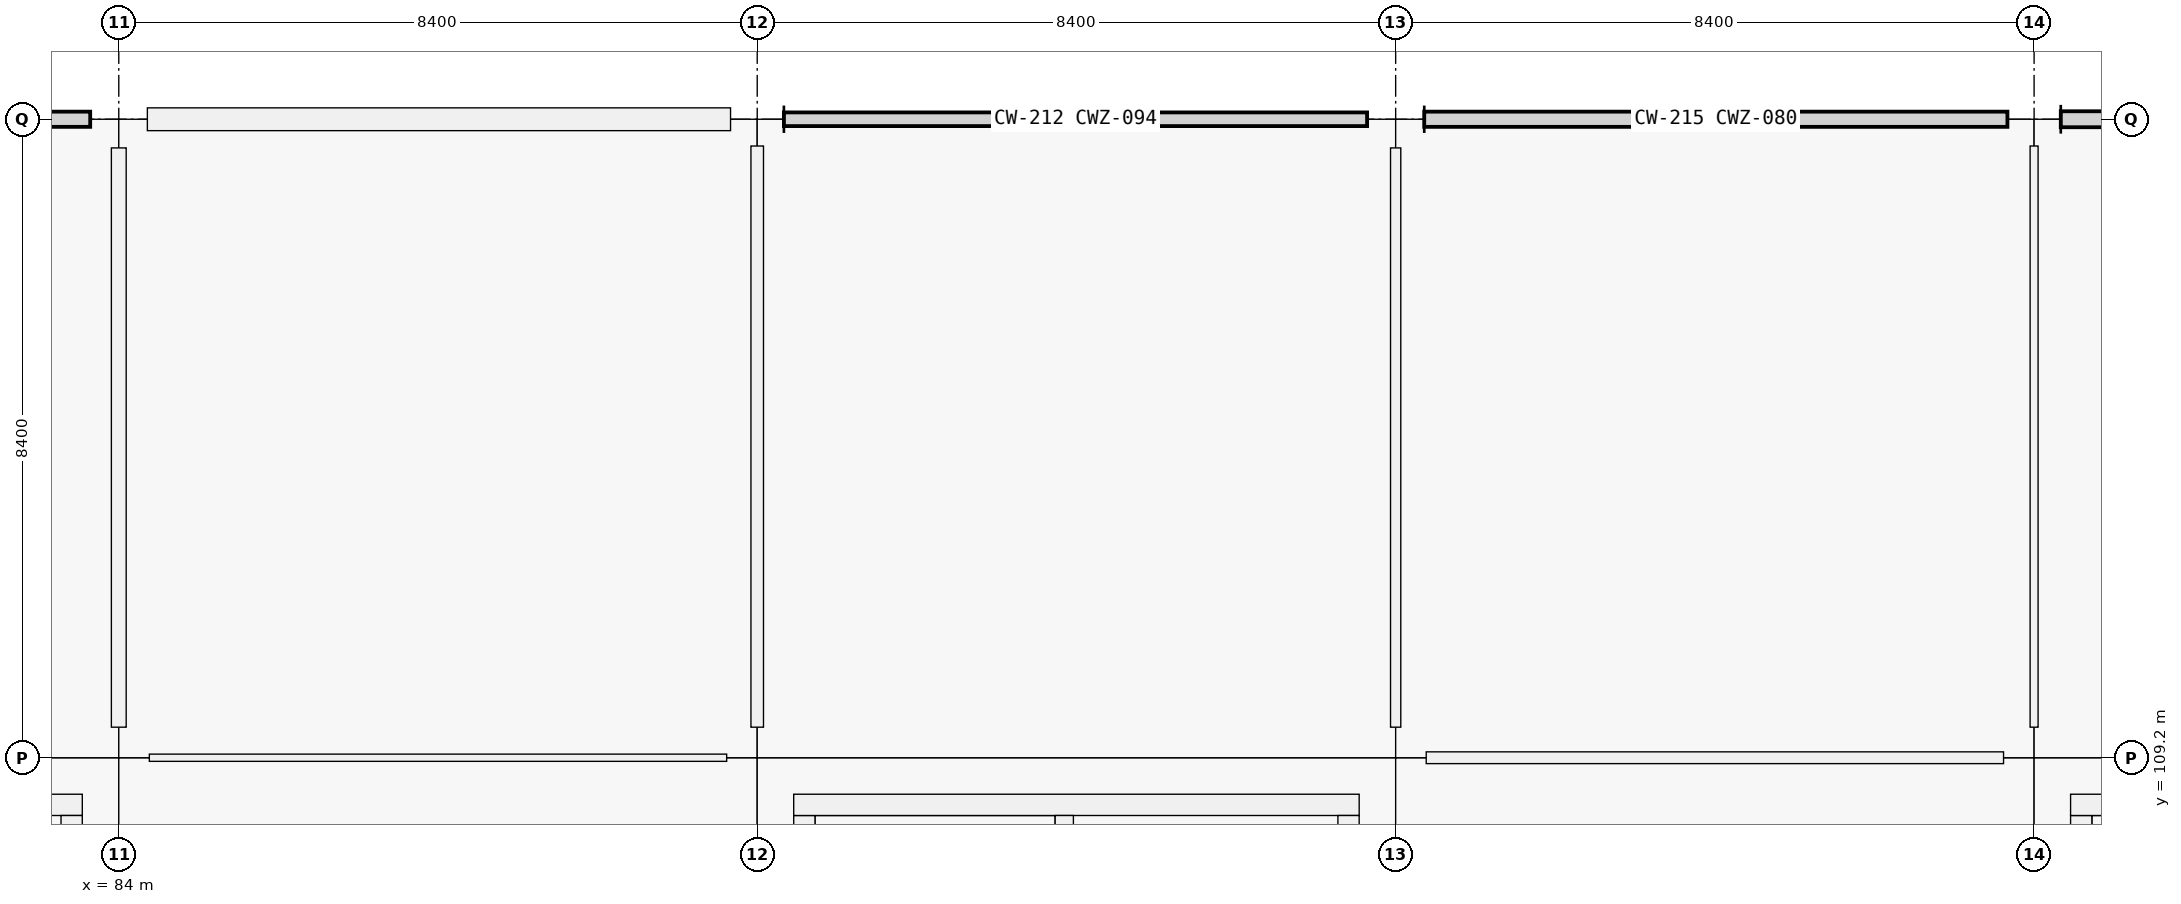
"""IFC4 building model, lengths in metres.
Left out: names, types, materials, properties, quantities, classifications, styles, units other than length and angle.
Written with IfcOpenShell. Run it as: python <this file> out.ifc"""

import sys

from ifc_helpers import new_model, si_unit, direction, frame, frame_2d, origin, origin_2d, place, context, subcontext, project, spatial, rectangle, extrude, element, fill, save


model = new_model("IFC4")
c1 = context("Model", 3, precision=1e-05, world=origin(), true_north=direction((0.0, 1.0)))
c2 = subcontext(c1, "Body", "Model", "MODEL_VIEW")
j1 = project(units=[si_unit("LENGTHUNIT", "METRE"), si_unit("PLANEANGLEUNIT", "RADIAN")], contexts=[c1])
p1 = place(None, origin())
s1 = spatial("IfcSite", under=j1, at=p1, CompositionType="ELEMENT")
p2 = place(p1, origin())
s2 = spatial("IfcBuilding", under=s1, at=p2, CompositionType="ELEMENT")
p3 = place(p2, frame((0.0, 0.0, 14.76)))
s3 = spatial("IfcBuildingStorey", under=s2, at=p3, CompositionType="ELEMENT", Elevation=14.76)
p4 = place(p3, frame((84.0, 109.2, 0.0), z_axis=(0.0, 0.0, 1.0), x_axis=(1.0, 0.0, 0.0)))
e1 = element("IfcColumn", 1, at=p4, inside=s3, PredefinedType="COLUMN", context=c2, shape_type="SweptSolid", body=[
    extrude(rectangle(XDim=0.8, YDim=0.8, at=origin_2d()), origin(), (0.0, 0.0, 1.0), 4.32),
])
p5 = place(p3, frame((84.0, 117.6, 0.0), z_axis=(0.0, 0.0, 1.0), x_axis=(1.0, 0.0, 0.0)))
e2 = element("IfcColumn", 2, at=p5, inside=s3, PredefinedType="COLUMN", context=c2, shape_type="SweptSolid", body=[
    extrude(rectangle(XDim=0.75, YDim=0.75, at=origin_2d()), origin(), (0.0, 0.0, 1.0), 4.32),
])
p6 = place(p3, frame((92.4, 109.2, 0.0), z_axis=(0.0, 0.0, 1.0), x_axis=(1.0, 0.0, 0.0)))
e3 = element("IfcColumn", 3, at=p6, inside=s3, PredefinedType="COLUMN", context=c2, shape_type="SweptSolid", body=[
    extrude(rectangle(XDim=0.8, YDim=0.8, at=origin_2d()), origin(), (0.0, 0.0, 1.0), 4.32),
])
p7 = place(p3, frame((92.4, 117.6, 0.0), z_axis=(0.0, 0.0, 1.0), x_axis=(1.0, 0.0, 0.0)))
e4 = element("IfcColumn", 4, at=p7, inside=s3, PredefinedType="COLUMN", context=c2, shape_type="SweptSolid", body=[
    extrude(rectangle(XDim=0.7, YDim=0.7, at=origin_2d()), origin(), (0.0, 0.0, 1.0), 4.32),
])
p8 = place(p3, frame((100.8, 109.2, 0.0), z_axis=(0.0, 0.0, 1.0), x_axis=(1.0, 0.0, 0.0)))
e5 = element("IfcColumn", 5, at=p8, inside=s3, PredefinedType="COLUMN", context=c2, shape_type="SweptSolid", body=[
    extrude(rectangle(XDim=0.8, YDim=0.8, at=origin_2d()), origin(), (0.0, 0.0, 1.0), 4.32),
])
p9 = place(p3, frame((100.8, 117.6, 0.0), z_axis=(0.0, 0.0, 1.0), x_axis=(1.0, 0.0, 0.0)))
e6 = element("IfcColumn", 6, at=p9, inside=s3, PredefinedType="COLUMN", context=c2, shape_type="SweptSolid", body=[
    extrude(rectangle(XDim=0.75, YDim=0.75, at=origin_2d()), origin(), (0.0, 0.0, 1.0), 4.32),
])
p10 = place(p3, frame((109.2, 109.2, 0.0), z_axis=(0.0, 0.0, 1.0), x_axis=(1.0, 0.0, 0.0)))
e7 = element("IfcColumn", 7, at=p10, inside=s3, PredefinedType="COLUMN", context=c2, shape_type="SweptSolid", body=[
    extrude(rectangle(XDim=0.8, YDim=0.8, at=origin_2d()), origin(), (0.0, 0.0, 1.0), 4.32),
])
p11 = place(p3, frame((109.2, 117.6, 0.0), z_axis=(0.0, 0.0, 1.0), x_axis=(1.0, 0.0, 0.0)))
e8 = element("IfcColumn", 8, at=p11, inside=s3, PredefinedType="COLUMN", context=c2, shape_type="SweptSolid", body=[
    extrude(rectangle(XDim=0.7, YDim=0.7, at=origin_2d()), origin(), (0.0, 0.0, 1.0), 4.32),
])
p12 = place(p3, frame((84.376, 117.6, 0.0), z_axis=(0.0, 0.0, 1.0), x_axis=(1.0, 0.0, 0.0)))
e9 = element("IfcWall", 9, at=p12, inside=s3, PredefinedType="SOLIDWALL", context=c2, shape_type="SweptSolid", body=[
    extrude(rectangle(XDim=7.673, YDim=0.3, at=frame_2d((3.836, 0.0))), origin(), (0.0, 0.0, 1.0), 3.37),
])
p13 = place(p12, frame((2.662, 0.0, 0.9)))
e10 = element("IfcOpeningElement", 10, at=p13, cuts=e9, PredefinedType="OPENING", context=c2, shape_type="SweptSolid", body=[
    extrude(rectangle(XDim=2.35, YDim=1.6, at=frame_2d((1.175, 0.8))), frame((0.0, 0.15, 0.0), z_axis=(0.0, -1.0, 0.0), x_axis=(1.0, 0.0, 0.0)), (0.0, 0.0, 1.0), 0.3),
])
p14 = place(p3, frame((109.82, 101.56, 0.0), z_axis=(0.0, 0.0, 1.0), x_axis=(0.0, 1.0, 0.0)))
e11 = element("IfcWall", 11, at=p14, inside=s3, PredefinedType="SHEAR", context=c2, shape_type="SweptSolid", body=[
    extrude(rectangle(XDim=6.88, YDim=0.28, at=frame_2d((3.44, 0.0))), origin(), (0.0, 0.0, 1.0), 4.32),
])
p15 = place(p3, frame((109.68, 108.58, 0.0), z_axis=(0.0, 0.0, 1.0), x_axis=(1.0, 0.0, 0.0)))
e12 = element("IfcWall", 12, at=p15, inside=s3, PredefinedType="SHEAR", context=c2, shape_type="SweptSolid", body=[
    extrude(rectangle(XDim=7.44, YDim=0.28, at=frame_2d((3.72, 0.0))), origin(), (0.0, 0.0, 1.0), 4.32),
])
p16 = place(p3, frame((76.08, 108.58, 0.0), z_axis=(0.0, 0.0, 1.0), x_axis=(1.0, 0.0, 0.0)))
e13 = element("IfcWall", 13, at=p16, inside=s3, PredefinedType="SHEAR", context=c2, shape_type="SweptSolid", body=[
    extrude(rectangle(XDim=7.44, YDim=0.28, at=frame_2d((3.72, 0.0))), origin(), (0.0, 0.0, 1.0), 4.32),
])
p17 = place(p3, frame((83.38, 108.44, 0.0), z_axis=(0.0, 0.0, 1.0), x_axis=(0.0, -1.0, 0.0)))
e14 = element("IfcWall", 14, at=p17, inside=s3, PredefinedType="SHEAR", context=c2, shape_type="SweptSolid", body=[
    extrude(rectangle(XDim=6.88, YDim=0.28, at=frame_2d((3.44, 0.0))), origin(), (0.0, 0.0, 1.0), 4.32),
])
p18 = place(p17, frame((3.99, 0.0, 0.0)))
e15 = element("IfcOpeningElement", 15, at=p18, cuts=e14, PredefinedType="OPENING", context=c2, shape_type="SweptSolid", body=[
    extrude(rectangle(XDim=1.5, YDim=2.15, at=frame_2d((0.75, 1.075))), frame((0.0, 0.14, 0.0), z_axis=(0.0, -1.0, 0.0), x_axis=(1.0, 0.0, 0.0)), (0.0, 0.0, 1.0), 0.28),
])
p19 = place(p3, frame((93.02, 101.56, 0.0), z_axis=(0.0, 0.0, 1.0), x_axis=(0.0, 1.0, 0.0)))
e16 = element("IfcWall", 16, at=p19, inside=s3, PredefinedType="SHEAR", context=c2, shape_type="SweptSolid", body=[
    extrude(rectangle(XDim=6.88, YDim=0.28, at=frame_2d((3.44, 0.0))), origin(), (0.0, 0.0, 1.0), 4.32),
])
p20 = place(p3, frame((92.88, 108.58, 0.0), z_axis=(0.0, 0.0, 1.0), x_axis=(1.0, 0.0, 0.0)))
e17 = element("IfcWall", 17, at=p20, inside=s3, PredefinedType="SHEAR", context=c2, shape_type="SweptSolid", body=[
    extrude(rectangle(XDim=7.44, YDim=0.28, at=frame_2d((3.72, 0.0))), origin(), (0.0, 0.0, 1.0), 4.32),
])
p21 = place(p3, frame((100.18, 108.44, 0.0), z_axis=(0.0, 0.0, 1.0), x_axis=(0.0, -1.0, 0.0)))
e18 = element("IfcWall", 18, at=p21, inside=s3, PredefinedType="SHEAR", context=c2, shape_type="SweptSolid", body=[
    extrude(rectangle(XDim=6.88, YDim=0.28, at=frame_2d((3.44, 0.0))), origin(), (0.0, 0.0, 1.0), 4.32),
])
p22 = place(p21, frame((3.99, 0.0, 0.0)))
e19 = element("IfcOpeningElement", 19, at=p22, cuts=e18, PredefinedType="OPENING", context=c2, shape_type="SweptSolid", body=[
    extrude(rectangle(XDim=1.5, YDim=2.15, at=frame_2d((0.75, 1.075))), frame((0.0, 0.14, 0.0), z_axis=(0.0, -1.0, 0.0), x_axis=(1.0, 0.0, 0.0)), (0.0, 0.0, 1.0), 0.28),
])
p23 = place(p3, frame((96.44, 101.56, 0.0), z_axis=(0.0, 0.0, 1.0), x_axis=(0.0, 1.0, 0.0)))
e20 = element("IfcWall", 20, at=p23, inside=s3, PredefinedType="SHEAR", context=c2, shape_type="SweptSolid", body=[
    extrude(rectangle(XDim=6.88, YDim=0.24, at=frame_2d((3.44, 0.0))), origin(), (0.0, 0.0, 1.0), 4.32),
])
p24 = place(p23, frame((0.12, 0.0, 0.0)))
e21 = element("IfcOpeningElement", 21, at=p24, cuts=e20, PredefinedType="OPENING", context=c2, shape_type="SweptSolid", body=[
    extrude(rectangle(XDim=1.0, YDim=2.15, at=frame_2d((0.5, 1.075))), frame((0.0, 0.12, 0.0), z_axis=(0.0, -1.0, 0.0), x_axis=(1.0, 0.0, 0.0)), (0.0, 0.0, 1.0), 0.24),
])
p25 = place(p3, frame((84.402, 109.2, 0.0), z_axis=(0.0, 0.0, 1.0), x_axis=(1.0, 0.0, 0.0)))
e22 = element("IfcWall", 22, at=p25, inside=s3, PredefinedType="PARTITIONING", context=c2, shape_type="SweptSolid", body=[
    extrude(rectangle(XDim=7.596, YDim=0.095, at=frame_2d((3.798, 0.0))), origin(), (0.0, 0.0, 1.0), 3.19),
])
p26 = place(p25, frame((3.308, 0.0, 0.0)))
e23 = element("IfcOpeningElement", 23, at=p26, cuts=e22, PredefinedType="OPENING", context=c2, shape_type="SweptSolid", body=[
    extrude(rectangle(XDim=0.98, YDim=2.18, at=frame_2d((0.49, 1.09))), frame((0.0, 0.047, 0.0), z_axis=(0.0, -1.0, 0.0), x_axis=(1.0, 0.0, 0.0)), (0.0, 0.0, 1.0), 0.095),
])
p27 = place(p3, frame((101.202, 109.2, 0.0), z_axis=(0.0, 0.0, 1.0), x_axis=(1.0, 0.0, 0.0)))
e24 = element("IfcWall", 24, at=p27, inside=s3, PredefinedType="PARTITIONING", context=c2, shape_type="SweptSolid", body=[
    extrude(rectangle(XDim=7.596, YDim=0.155, at=frame_2d((3.798, 0.0))), origin(), (0.0, 0.0, 1.0), 3.19),
])
p28 = place(p27, frame((3.273, 0.0, 0.0)))
e25 = element("IfcOpeningElement", 25, at=p28, cuts=e24, PredefinedType="OPENING", context=c2, shape_type="SweptSolid", body=[
    extrude(rectangle(XDim=1.05, YDim=2.12, at=frame_2d((0.525, 1.06))), frame((0.0, 0.078, 0.0), z_axis=(0.0, -1.0, 0.0), x_axis=(1.0, 0.0, 0.0)), (0.0, 0.0, 1.0), 0.155),
])
p29 = place(p3, frame((84.0, 109.602, 0.0), z_axis=(0.0, 0.0, 1.0), x_axis=(0.0, 1.0, 0.0)))
e26 = element("IfcWall", 26, at=p29, inside=s3, PredefinedType="PARTITIONING", context=c2, shape_type="SweptSolid", body=[
    extrude(rectangle(XDim=7.621, YDim=0.195, at=frame_2d((3.811, 0.0))), origin(), (0.0, 0.0, 1.0), 3.19),
])
p30 = place(p29, frame((3.301, 0.0, 0.0)))
e27 = element("IfcOpeningElement", 27, at=p30, cuts=e26, PredefinedType="OPENING", context=c2, shape_type="SweptSolid", body=[
    extrude(rectangle(XDim=1.02, YDim=2.2, at=frame_2d((0.51, 1.1))), frame((0.0, 0.098, 0.0), z_axis=(0.0, -1.0, 0.0), x_axis=(1.0, 0.0, 0.0)), (0.0, 0.0, 1.0), 0.195),
])
p31 = place(p3, frame((92.4, 109.602, 0.0), z_axis=(0.0, 0.0, 1.0), x_axis=(0.0, 1.0, 0.0)))
e28 = element("IfcWall", 28, at=p31, inside=s3, PredefinedType="PARTITIONING", context=c2, shape_type="SweptSolid", body=[
    extrude(rectangle(XDim=7.646, YDim=0.165, at=frame_2d((3.823, 0.0))), origin(), (0.0, 0.0, 1.0), 3.19),
])
p32 = place(p31, frame((3.323, 0.0, 0.0)))
e29 = element("IfcOpeningElement", 29, at=p32, cuts=e28, PredefinedType="OPENING", context=c2, shape_type="SweptSolid", body=[
    extrude(rectangle(XDim=1.0, YDim=2.2, at=frame_2d((0.5, 1.1))), frame((0.0, 0.083, 0.0), z_axis=(0.0, -1.0, 0.0), x_axis=(1.0, 0.0, 0.0)), (0.0, 0.0, 1.0), 0.165),
])
p33 = place(p3, frame((100.8, 109.602, 0.0), z_axis=(0.0, 0.0, 1.0), x_axis=(0.0, 1.0, 0.0)))
e30 = element("IfcWall", 30, at=p33, inside=s3, PredefinedType="PARTITIONING", context=c2, shape_type="SweptSolid", body=[
    extrude(rectangle(XDim=7.621, YDim=0.135, at=frame_2d((3.811, 0.0))), origin(), (0.0, 0.0, 1.0), 3.19),
])
p34 = place(p33, frame((3.291, 0.0, 0.0)))
e31 = element("IfcOpeningElement", 31, at=p34, cuts=e30, PredefinedType="OPENING", context=c2, shape_type="SweptSolid", body=[
    extrude(rectangle(XDim=1.04, YDim=2.2, at=frame_2d((0.52, 1.1))), frame((0.0, 0.067, 0.0), z_axis=(0.0, -1.0, 0.0), x_axis=(1.0, 0.0, 0.0)), (0.0, 0.0, 1.0), 0.135),
])
p35 = place(p3, frame((109.2, 109.602, 0.0), z_axis=(0.0, 0.0, 1.0), x_axis=(0.0, 1.0, 0.0)))
e32 = element("IfcWall", 32, at=p35, inside=s3, PredefinedType="PARTITIONING", context=c2, shape_type="SweptSolid", body=[
    extrude(rectangle(XDim=7.646, YDim=0.105, at=frame_2d((3.823, 0.0))), origin(), (0.0, 0.0, 1.0), 3.19),
])
p36 = place(p35, frame((3.333, 0.0, 0.0)))
e33 = element("IfcOpeningElement", 33, at=p36, cuts=e32, PredefinedType="OPENING", context=c2, shape_type="SweptSolid", body=[
    extrude(rectangle(XDim=0.98, YDim=2.18, at=frame_2d((0.49, 1.09))), frame((0.0, 0.052, 0.0), z_axis=(0.0, -1.0, 0.0), x_axis=(1.0, 0.0, 0.0)), (0.0, 0.0, 1.0), 0.105),
])
p37 = place(p13, origin())
e34 = element("IfcWindow", 34, at=p37, inside=s3, PartitioningType="SINGLE_PANEL", PredefinedType="WINDOW", context=c2, shape_type="SweptSolid", body=[
    extrude(rectangle(XDim=2.35, YDim=1.6, at=frame_2d((1.175, 0.8))), frame((0.0, 0.03, 0.0), z_axis=(0.0, -1.0, 0.0), x_axis=(1.0, 0.0, 0.0)), (0.0, 0.0, 1.0), 0.06),
])
fill(e10, e34)
p38 = place(p26, origin())
e35 = element("IfcDoor", 35, at=p38, inside=s3, OperationType="SINGLE_SWING_LEFT", PredefinedType="DOOR", context=c2, shape_type="SweptSolid", body=[
    extrude(rectangle(XDim=0.98, YDim=2.18, at=frame_2d((0.49, 1.09))), frame((0.0, 0.025, 0.0), z_axis=(0.0, -1.0, 0.0), x_axis=(1.0, 0.0, 0.0)), (0.0, 0.0, 1.0), 0.05),
])
fill(e23, e35)
p39 = place(p28, origin())
e36 = element("IfcDoor", 36, at=p39, inside=s3, OperationType="SINGLE_SWING_RIGHT", PredefinedType="DOOR", context=c2, shape_type="SweptSolid", body=[
    extrude(rectangle(XDim=1.05, YDim=2.12, at=frame_2d((0.525, 1.06))), frame((0.0, 0.025, 0.0), z_axis=(0.0, -1.0, 0.0), x_axis=(1.0, 0.0, 0.0)), (0.0, 0.0, 1.0), 0.05),
])
fill(e25, e36)
p40 = place(p30, origin())
e37 = element("IfcDoor", 37, at=p40, inside=s3, OperationType="SINGLE_SWING_LEFT", PredefinedType="DOOR", context=c2, shape_type="SweptSolid", body=[
    extrude(rectangle(XDim=1.02, YDim=2.2, at=frame_2d((0.51, 1.1))), frame((0.0, 0.025, 0.0), z_axis=(0.0, -1.0, 0.0), x_axis=(1.0, 0.0, 0.0)), (0.0, 0.0, 1.0), 0.05),
])
fill(e27, e37)
p41 = place(p32, origin())
e38 = element("IfcDoor", 38, at=p41, inside=s3, OperationType="SINGLE_SWING_RIGHT", PredefinedType="DOOR", context=c2, shape_type="SweptSolid", body=[
    extrude(rectangle(XDim=1.0, YDim=2.2, at=frame_2d((0.5, 1.1))), frame((0.0, 0.025, 0.0), z_axis=(0.0, -1.0, 0.0), x_axis=(1.0, 0.0, 0.0)), (0.0, 0.0, 1.0), 0.05),
])
fill(e29, e38)
p42 = place(p36, origin())
e39 = element("IfcDoor", 39, at=p42, inside=s3, OperationType="SINGLE_SWING_LEFT", PredefinedType="DOOR", context=c2, shape_type="SweptSolid", body=[
    extrude(rectangle(XDim=0.98, YDim=2.18, at=frame_2d((0.49, 1.09))), frame((0.0, 0.025, 0.0), z_axis=(0.0, -1.0, 0.0), x_axis=(1.0, 0.0, 0.0)), (0.0, 0.0, 1.0), 0.05),
])
fill(e33, e39)
p43 = place(p34, origin())
e40 = element("IfcDoor", 40, at=p43, inside=s3, OperationType="SINGLE_SWING_LEFT", PredefinedType="DOOR", context=c2, shape_type="SweptSolid", body=[
    extrude(rectangle(XDim=1.04, YDim=2.2, at=frame_2d((0.52, 1.1))), frame((0.0, 0.025, 0.0), z_axis=(0.0, -1.0, 0.0), x_axis=(1.0, 0.0, 0.0)), (0.0, 0.0, 1.0), 0.05),
])
fill(e31, e40)
save(model, sys.argv[1])
